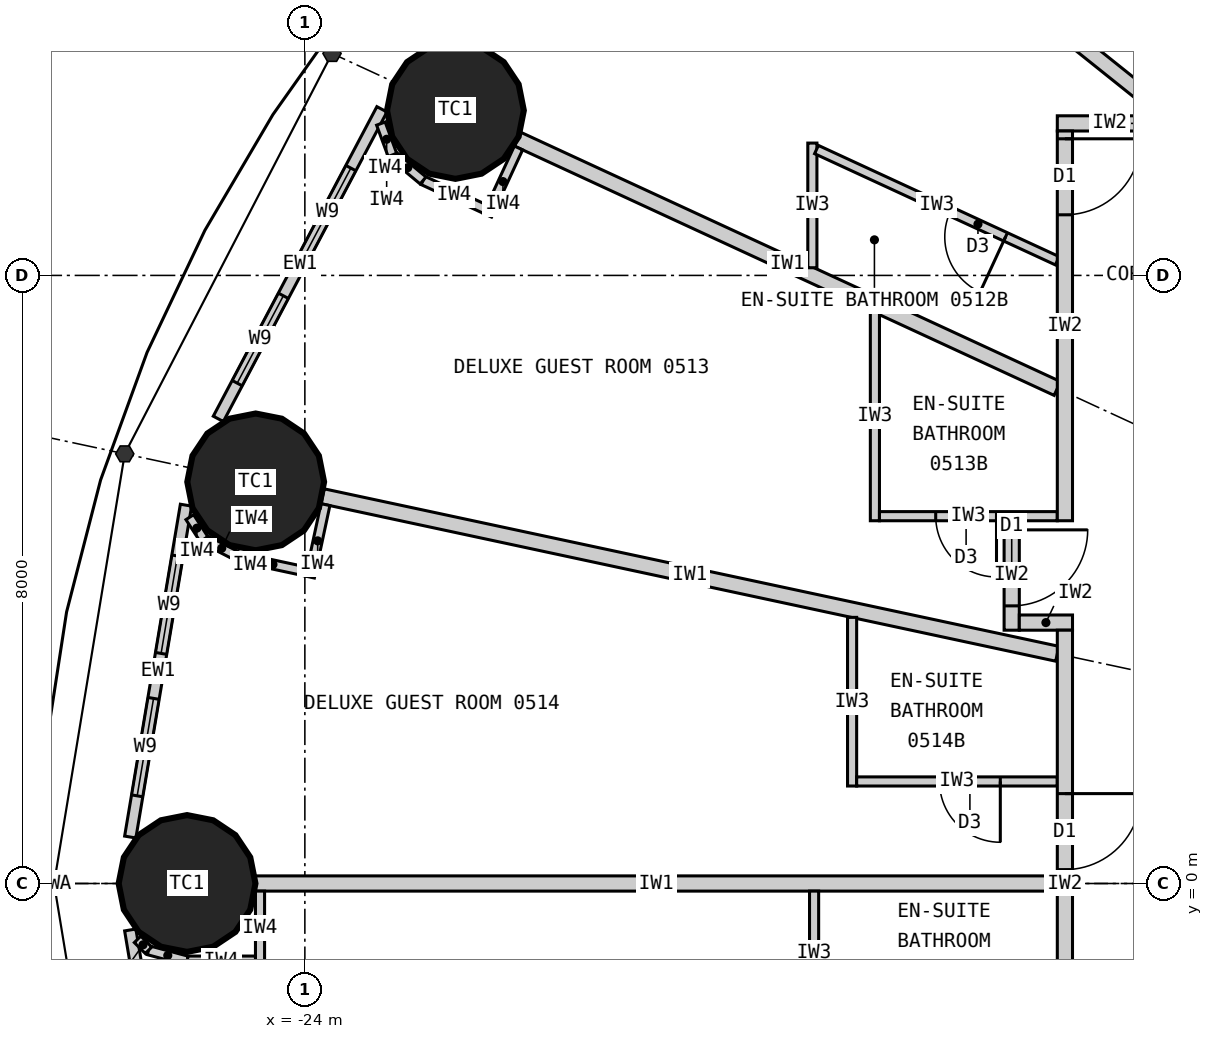
"""IFC4 building model, lengths in metres.
Left out: names, types, materials, properties, quantities, classifications, styles, units other than length and angle.
Written with IfcOpenShell. Run it as: python <this file> out.ifc"""

import sys

from ifc_helpers import new_model, si_unit, direction, frame, frame_2d, origin, origin_2d, place, context, subcontext, project, spatial, rectangle, circle, extrude, element, fill, save


model = new_model("IFC4")
c1 = context("Model", 3, precision=1e-05, world=origin(), true_north=direction((0.0, 1.0)))
c2 = subcontext(c1, "Body", "Model", "MODEL_VIEW")
j1 = project(units=[si_unit("LENGTHUNIT", "METRE"), si_unit("PLANEANGLEUNIT", "RADIAN")], contexts=[c1])
p1 = place(None, origin())
s1 = spatial("IfcSite", under=j1, at=p1, CompositionType="ELEMENT")
p2 = place(p1, origin())
s2 = spatial("IfcBuilding", under=s1, at=p2, CompositionType="ELEMENT")
p3 = place(p2, frame((0.0, 0.0, 29.4)))
s3 = spatial("IfcBuildingStorey", under=s2, at=p3, CompositionType="ELEMENT", Elevation=29.4)
for number, where, z_axis, x_axis in (
    (1, (-22.019, 10.17, 0.0), (0.0, 0.0, 1.0), (1.0, 0.0, 0.0)),
    (2, (-24.647, 5.283, 0.0), (0.0, 0.0, 1.0), (1.0, 0.0, 0.0)),
    (3, (-25.55, 0.0, 0.0), (0.0, 0.0, 1.0), (1.0, 0.0, 0.0)),
):
    element("IfcColumn", number, at=place(p3, frame(where, z_axis=z_axis, x_axis=x_axis)), inside=s3, PredefinedType="COLUMN", context=c2, shape_type="SweptSolid", body=[
        extrude(circle(Radius=0.9, at=origin_2d()), origin(), (0.0, 0.0, 1.0), 3.3),
    ])
p4 = place(p3, frame((-22.986, 10.185, 0.0), z_axis=(0.0, 0.0, 1.0), x_axis=(-0.467303182954, -0.884097129959, 0.0)))
e4 = element("IfcWall", 4, at=p4, inside=s3, PredefinedType="ELEMENTEDWALL", context=c2, shape_type="SweptSolid", body=[
    extrude(rectangle(XDim=4.606, YDim=0.15, at=frame_2d((2.303, 0.0))), origin(), (0.0, 0.0, 1.0), 3.12),
])
p5 = place(p4, frame((0.875, 0.0, 0.9)))
e5 = element("IfcOpeningElement", 5, at=p5, cuts=e4, PredefinedType="OPENING", context=c2, shape_type="SweptSolid", body=[
    extrude(rectangle(XDim=1.3, YDim=1.9, at=frame_2d((0.65, 0.95))), frame((0.0, 0.085, 0.0), z_axis=(0.0, -1.0, 0.0), x_axis=(1.0, 0.0, 0.0)), (0.0, 0.0, 1.0), 0.17),
])
p6 = place(p4, frame((2.775, 0.0, 0.9)))
e6 = element("IfcOpeningElement", 6, at=p6, cuts=e4, PredefinedType="OPENING", context=c2, shape_type="SweptSolid", body=[
    extrude(rectangle(XDim=1.3, YDim=1.9, at=frame_2d((0.65, 0.95))), frame((0.0, 0.085, 0.0), z_axis=(0.0, -1.0, 0.0), x_axis=(1.0, 0.0, 0.0)), (0.0, 0.0, 1.0), 0.17),
])
p7 = place(p3, frame((-25.564, 4.978, 0.0), z_axis=(0.0, 0.0, 1.0), x_axis=(-0.165641751141, -0.986185991727, 0.0)))
e7 = element("IfcWall", 7, at=p7, inside=s3, PredefinedType="ELEMENTEDWALL", context=c2, shape_type="SweptSolid", body=[
    extrude(rectangle(XDim=4.428, YDim=0.15, at=frame_2d((2.214, 0.0))), origin(), (0.0, 0.0, 1.0), 3.12),
])
p8 = place(p7, frame((0.678, 0.0, 0.9)))
e8 = element("IfcOpeningElement", 8, at=p8, cuts=e7, PredefinedType="OPENING", context=c2, shape_type="SweptSolid", body=[
    extrude(rectangle(XDim=1.3, YDim=1.9, at=frame_2d((0.65, 0.95))), frame((0.0, 0.085, 0.0), z_axis=(0.0, -1.0, 0.0), x_axis=(1.0, 0.0, 0.0)), (0.0, 0.0, 1.0), 0.17),
])
p9 = place(p7, frame((2.578, 0.0, 0.9)))
e9 = element("IfcOpeningElement", 9, at=p9, cuts=e7, PredefinedType="OPENING", context=c2, shape_type="SweptSolid", body=[
    extrude(rectangle(XDim=1.3, YDim=1.9, at=frame_2d((0.65, 0.95))), frame((0.0, 0.085, 0.0), z_axis=(0.0, -1.0, 0.0), x_axis=(1.0, 0.0, 0.0)), (0.0, 0.0, 1.0), 0.17),
])
p10 = place(p3, frame((-26.297, -0.611, 0.0), z_axis=(0.0, 0.0, 1.0), x_axis=(0.165641751141, -0.986185991727, 0.0)))
e10 = element("IfcWall", 10, at=p10, inside=s3, PredefinedType="ELEMENTEDWALL", context=c2, shape_type="SweptSolid", body=[
    extrude(rectangle(XDim=4.428, YDim=0.15, at=frame_2d((2.214, 0.0))), origin(), (0.0, 0.0, 1.0), 3.12),
])
p11 = place(p10, frame((0.55, 0.0, 0.9)))
e11 = element("IfcOpeningElement", 11, at=p11, cuts=e10, PredefinedType="OPENING", context=c2, shape_type="SweptSolid", body=[
    extrude(rectangle(XDim=1.3, YDim=1.9, at=frame_2d((0.65, 0.95))), frame((0.0, 0.085, 0.0), z_axis=(0.0, -1.0, 0.0), x_axis=(1.0, 0.0, 0.0)), (0.0, 0.0, 1.0), 0.17),
])
p12 = place(p10, frame((2.45, 0.0, 0.9)))
e12 = element("IfcOpeningElement", 12, at=p12, cuts=e10, PredefinedType="OPENING", context=c2, shape_type="SweptSolid", body=[
    extrude(rectangle(XDim=1.3, YDim=1.9, at=frame_2d((0.65, 0.95))), frame((0.0, 0.085, 0.0), z_axis=(0.0, -1.0, 0.0), x_axis=(1.0, 0.0, 0.0)), (0.0, 0.0, 1.0), 0.17),
])
p13 = place(p3, frame((-12.625, 10.1, 0.0), z_axis=(0.0, 0.0, 1.0), x_axis=(-0.780872884676, 0.624689953479, 0.0)))
e13 = element("IfcWall", 13, at=p13, inside=s3, PredefinedType="PARTITIONING", context=c2, shape_type="SweptSolid", body=[
    extrude(rectangle(XDim=5.845, YDim=0.2, at=frame_2d((2.922, 0.0))), origin(), (0.0, 0.0, 1.0), 2.32),
])
p14 = place(p3, frame((-14.1, 6.512, 0.0), z_axis=(0.0, 0.0, 1.0), x_axis=(-0.907842433118, 0.41931147925, 0.0)))
e14 = element("IfcWall", 14, at=p14, inside=s3, PredefinedType="PARTITIONING", context=c2, shape_type="SweptSolid", body=[
    extrude(rectangle(XDim=7.823, YDim=0.2, at=frame_2d((3.912, 0.0))), origin(), (0.0, 0.0, 1.0), 2.32),
])
p15 = place(p3, frame((-14.1, 3.022, 0.0), z_axis=(0.0, 0.0, 1.0), x_axis=(-0.977786510688, 0.209603290805, 0.0)))
e15 = element("IfcWall", 15, at=p15, inside=s3, PredefinedType="PARTITIONING", context=c2, shape_type="SweptSolid", body=[
    extrude(rectangle(XDim=9.887, YDim=0.2, at=frame_2d((4.943, 0.0))), origin(), (0.0, 0.0, 1.0), 2.32),
])
p16 = place(p3, frame((-14.1, 0.0, 0.0), z_axis=(0.0, 0.0, 1.0), x_axis=(-1.0, 0.0, 0.0)))
e16 = element("IfcWall", 16, at=p16, inside=s3, PredefinedType="PARTITIONING", context=c2, shape_type="SweptSolid", body=[
    extrude(rectangle(XDim=10.55, YDim=0.2, at=frame_2d((5.275, 0.0))), origin(), (0.0, 0.0, 1.0), 2.27),
])
p17 = place(p3, frame((-17.323, 8.101, 0.0), z_axis=(0.0, 0.0, 1.0), x_axis=(0.0, 1.0, 0.0)))
e17 = element("IfcWall", 17, at=p17, inside=s3, PredefinedType="PARTITIONING", context=c2, shape_type="SweptSolid", body=[
    extrude(rectangle(XDim=1.64, YDim=0.12, at=frame_2d((0.82, 0.0))), origin(), (0.0, 0.0, 1.0), 3.12),
])
p18 = place(p3, frame((-14.1, 8.193, 0.0), z_axis=(0.0, 0.0, 1.0), x_axis=(-0.907836493557, 0.419324338628, 0.0)))
e18 = element("IfcWall", 18, at=p18, inside=s3, PredefinedType="PARTITIONING", context=c2, shape_type="SweptSolid", body=[
    extrude(rectangle(XDim=3.49, YDim=0.12, at=frame_2d((1.745, 0.0))), origin(), (0.0, 0.0, 1.0), 3.12),
])
p19 = place(p18, frame((0.75, 0.0, 0.0)))
e19 = element("IfcOpeningElement", 19, at=p19, cuts=e18, PredefinedType="OPENING", context=c2, shape_type="SweptSolid", body=[
    extrude(rectangle(XDim=0.8, YDim=2.1, at=frame_2d((0.4, 1.05))), frame((0.0, 0.07, 0.0), z_axis=(0.0, -1.0, 0.0), x_axis=(1.0, 0.0, 0.0)), (0.0, 0.0, 1.0), 0.14),
])
p20 = place(p3, frame((-16.5, 7.521, 0.0), z_axis=(0.0, 0.0, 1.0), x_axis=(0.0, -1.0, 0.0)))
e20 = element("IfcWall", 20, at=p20, inside=s3, PredefinedType="PARTITIONING", context=c2, shape_type="SweptSolid", body=[
    extrude(rectangle(XDim=2.749, YDim=0.12, at=frame_2d((1.374, 0.0))), origin(), (0.0, 0.0, 1.0), 3.12),
])
p21 = place(p3, frame((-14.1, 4.833, 0.0), z_axis=(0.0, 0.0, 1.0), x_axis=(-1.0, 0.0, 0.0)))
e21 = element("IfcWall", 21, at=p21, inside=s3, PredefinedType="PARTITIONING", context=c2, shape_type="SweptSolid", body=[
    extrude(rectangle(XDim=2.34, YDim=0.12, at=frame_2d((1.17, 0.0))), origin(), (0.0, 0.0, 1.0), 3.12),
])
p22 = place(p21, frame((0.8, 0.0, 0.0)))
e22 = element("IfcOpeningElement", 22, at=p22, cuts=e21, PredefinedType="OPENING", context=c2, shape_type="SweptSolid", body=[
    extrude(rectangle(XDim=0.8, YDim=2.1, at=frame_2d((0.4, 1.05))), frame((0.0, 0.07, 0.0), z_axis=(0.0, -1.0, 0.0), x_axis=(1.0, 0.0, 0.0)), (0.0, 0.0, 1.0), 0.14),
])
p23 = place(p3, frame((-16.8, 3.501, 0.0), z_axis=(0.0, 0.0, 1.0), x_axis=(0.0, -1.0, 0.0)))
e23 = element("IfcWall", 23, at=p23, inside=s3, PredefinedType="PARTITIONING", context=c2, shape_type="SweptSolid", body=[
    extrude(rectangle(XDim=2.219, YDim=0.12, at=frame_2d((1.109, 0.0))), origin(), (0.0, 0.0, 1.0), 3.12),
])
p24 = place(p3, frame((-14.1, 1.343, 0.0), z_axis=(0.0, 0.0, 1.0), x_axis=(-1.0, 0.0, 0.0)))
e24 = element("IfcWall", 24, at=p24, inside=s3, PredefinedType="PARTITIONING", context=c2, shape_type="SweptSolid", body=[
    extrude(rectangle(XDim=2.64, YDim=0.12, at=frame_2d((1.32, 0.0))), origin(), (0.0, 0.0, 1.0), 3.12),
])
p25 = place(p24, frame((0.75, 0.0, 0.0)))
e25 = element("IfcOpeningElement", 25, at=p25, cuts=e24, PredefinedType="OPENING", context=c2, shape_type="SweptSolid", body=[
    extrude(rectangle(XDim=0.8, YDim=2.1, at=frame_2d((0.4, 1.05))), frame((0.0, 0.07, 0.0), z_axis=(0.0, -1.0, 0.0), x_axis=(1.0, 0.0, 0.0)), (0.0, 0.0, 1.0), 0.14),
])
p26 = place(p3, frame((-17.3, -0.1, 0.0), z_axis=(0.0, 0.0, 1.0), x_axis=(0.0, -1.0, 0.0)))
e26 = element("IfcWall", 26, at=p26, inside=s3, PredefinedType="PARTITIONING", context=c2, shape_type="SweptSolid", body=[
    extrude(rectangle(XDim=1.64, YDim=0.12, at=frame_2d((0.82, 0.0))), origin(), (0.0, 0.0, 1.0), 3.12),
])
p27 = place(p3, frame((-14.7, 4.772, 0.0), z_axis=(0.0, 0.0, 1.0), x_axis=(0.0, -1.0, 0.0)))
e27 = element("IfcWall", 27, at=p27, inside=s3, PredefinedType="PARTITIONING", context=c2, shape_type="SweptSolid", body=[
    extrude(rectangle(XDim=1.44, YDim=0.2, at=frame_2d((0.72, 0.0))), origin(), (0.0, 0.0, 1.0), 3.12),
])
p28 = place(p27, frame((0.12, 0.0, 0.0)))
e28 = element("IfcOpeningElement", 28, at=p28, cuts=e27, PredefinedType="OPENING", context=c2, shape_type="SweptSolid", body=[
    extrude(rectangle(XDim=1.0, YDim=2.2, at=frame_2d((0.5, 1.1))), frame((0.0, 0.11, 0.0), z_axis=(0.0, -1.0, 0.0), x_axis=(1.0, 0.0, 0.0)), (0.0, 0.0, 1.0), 0.22),
])
p29 = place(p3, frame((-13.9, 3.433, 0.0), z_axis=(0.0, 0.0, 1.0), x_axis=(-1.0, 0.0, 0.0)))
e29 = element("IfcWall", 29, at=p29, inside=s3, PredefinedType="PARTITIONING", context=c2, shape_type="SweptSolid", body=[
    extrude(rectangle(XDim=0.7, YDim=0.2, at=frame_2d((0.35, 0.0))), origin(), (0.0, 0.0, 1.0), 2.32),
])
p30 = place(p3, frame((-14.1, 10.0, 0.0), z_axis=(0.0, 0.0, 1.0), x_axis=(1.0, 0.0, 0.0)))
e30 = element("IfcWall", 30, at=p30, inside=s3, PredefinedType="PARTITIONING", context=c2, shape_type="SweptSolid", body=[
    extrude(rectangle(XDim=2.481, YDim=0.2, at=frame_2d((1.24, 0.0))), origin(), (0.0, 0.0, 1.0), 3.12),
])
p31 = place(p3, frame((-14.0, 9.9, 0.0), z_axis=(0.0, 0.0, 1.0), x_axis=(0.0, -1.0, 0.0)))
e31 = element("IfcWall", 31, at=p31, inside=s3, PredefinedType="PARTITIONING", context=c2, shape_type="SweptSolid", body=[
    extrude(rectangle(XDim=5.127, YDim=0.2, at=frame_2d((2.564, 0.0))), origin(), (0.0, 0.0, 1.0), 3.12),
])
p32 = place(p31, frame((0.103, 0.0, 0.0)))
e32 = element("IfcOpeningElement", 32, at=p32, cuts=e31, PredefinedType="OPENING", context=c2, shape_type="SweptSolid", body=[
    extrude(rectangle(XDim=1.0, YDim=2.2, at=frame_2d((0.5, 1.1))), frame((0.0, 0.11, 0.0), z_axis=(0.0, -1.0, 0.0), x_axis=(1.0, 0.0, 0.0)), (0.0, 0.0, 1.0), 0.22),
])
p33 = place(p3, frame((-14.0, 3.333, 0.0), z_axis=(0.0, 0.0, 1.0), x_axis=(0.0, -1.0, 0.0)))
e33 = element("IfcWall", 33, at=p33, inside=s3, PredefinedType="PARTITIONING", context=c2, shape_type="SweptSolid", body=[
    extrude(rectangle(XDim=6.665, YDim=0.2, at=frame_2d((3.333, 0.0))), origin(), (0.0, 0.0, 1.0), 3.12),
])
p34 = place(p33, frame((2.15, 0.0, 0.0)))
e34 = element("IfcOpeningElement", 34, at=p34, cuts=e33, PredefinedType="OPENING", context=c2, shape_type="SweptSolid", body=[
    extrude(rectangle(XDim=1.0, YDim=2.2, at=frame_2d((0.5, 1.1))), frame((0.0, 0.11, 0.0), z_axis=(0.0, -1.0, 0.0), x_axis=(1.0, 0.0, 0.0)), (0.0, 0.0, 1.0), 0.22),
])
p35 = place(p33, frame((5.173, 0.0, 0.0)))
e35 = element("IfcOpeningElement", 35, at=p35, cuts=e33, PredefinedType="OPENING", context=c2, shape_type="SweptSolid", body=[
    extrude(rectangle(XDim=1.0, YDim=2.2, at=frame_2d((0.5, 1.1))), frame((0.0, 0.11, 0.0), z_axis=(0.0, -1.0, 0.0), x_axis=(1.0, 0.0, 0.0)), (0.0, 0.0, 1.0), 0.22),
])
p36 = place(p3, frame((-21.189, 9.677, 0.0), z_axis=(0.0, 0.0, 1.0), x_axis=(-0.419344098106, -0.907827366509, 0.0)))
e36 = element("IfcWall", 36, at=p36, inside=s3, PredefinedType="PARTITIONING", context=c2, shape_type="SweptSolid", body=[
    extrude(rectangle(XDim=0.975, YDim=0.12, at=frame_2d((0.487, 0.0))), origin(), (0.0, 0.0, 1.0), 3.12),
])
p37 = place(p3, frame((-21.627, 8.872, 0.0), z_axis=(0.0, 0.0, 1.0), x_axis=(-0.907935564339, 0.419109783957, 0.0)))
e37 = element("IfcWall", 37, at=p37, inside=s3, PredefinedType="PARTITIONING", context=c2, shape_type="SweptSolid", body=[
    extrude(rectangle(XDim=0.9, YDim=0.12, at=frame_2d((0.45, 0.0))), origin(), (0.0, 0.0, 1.0), 3.12),
])
p38 = place(p3, frame((-22.445, 9.249, 0.0), z_axis=(0.0, 0.0, 1.0), x_axis=(-0.768335565584, 0.640047231584, 0.0)))
e38 = element("IfcWall", 38, at=p38, inside=s3, PredefinedType="PARTITIONING", context=c2, shape_type="SweptSolid", body=[
    extrude(rectangle(XDim=0.525, YDim=0.12, at=frame_2d((0.263, 0.0))), origin(), (0.0, 0.0, 1.0), 3.12),
])
p39 = place(p3, frame((-22.848, 9.585, 0.0), z_axis=(0.0, 0.0, 1.0), x_axis=(-0.345267312673, 0.938504386138, 0.0)))
e39 = element("IfcWall", 39, at=p39, inside=s3, PredefinedType="PARTITIONING", context=c2, shape_type="SweptSolid", body=[
    extrude(rectangle(XDim=0.439, YDim=0.12, at=frame_2d((0.22, 0.0))), origin(), (0.0, 0.0, 1.0), 3.12),
])
p40 = place(p3, frame((-23.729, 4.984, 0.0), z_axis=(0.0, 0.0, 1.0), x_axis=(-0.20968306268, -0.977769406979, 0.0)))
e40 = element("IfcWall", 40, at=p40, inside=s3, PredefinedType="PARTITIONING", context=c2, shape_type="SweptSolid", body=[
    extrude(rectangle(XDim=0.975, YDim=0.12, at=frame_2d((0.487, 0.0))), origin(), (0.0, 0.0, 1.0), 3.12),
])
p41 = place(p3, frame((-23.98, 4.103, 0.0), z_axis=(0.0, 0.0, 1.0), x_axis=(-0.977762694187, 0.209714362543, 0.0)))
e41 = element("IfcWall", 41, at=p41, inside=s3, PredefinedType="PARTITIONING", context=c2, shape_type="SweptSolid", body=[
    extrude(rectangle(XDim=0.9, YDim=0.12, at=frame_2d((0.45, 0.0))), origin(), (0.0, 0.0, 1.0), 3.12),
])
p42 = place(p3, frame((-24.86, 4.291, 0.0), z_axis=(0.0, 0.0, 1.0), x_axis=(-0.890204323062, 0.455561481254, 0.0)))
e42 = element("IfcWall", 42, at=p42, inside=s3, PredefinedType="PARTITIONING", context=c2, shape_type="SweptSolid", body=[
    extrude(rectangle(XDim=0.525, YDim=0.12, at=frame_2d((0.263, 0.0))), origin(), (0.0, 0.0, 1.0), 3.12),
])
p43 = place(p3, frame((-25.327, 4.531, 0.0), z_axis=(0.0, 0.0, 1.0), x_axis=(-0.543516034791, 0.839398784801, 0.0)))
e43 = element("IfcWall", 43, at=p43, inside=s3, PredefinedType="PARTITIONING", context=c2, shape_type="SweptSolid", body=[
    extrude(rectangle(XDim=0.344, YDim=0.12, at=frame_2d((0.172, 0.0))), origin(), (0.0, 0.0, 1.0), 3.12),
])
p44 = place(p3, frame((-24.59, -0.1, 0.0), z_axis=(0.0, 0.0, 1.0), x_axis=(0.0, -1.0, 0.0)))
e44 = element("IfcWall", 44, at=p44, inside=s3, PredefinedType="PARTITIONING", context=c2, shape_type="SweptSolid", body=[
    extrude(rectangle(XDim=0.974, YDim=0.12, at=frame_2d((0.487, 0.0))), origin(), (0.0, 0.0, 1.0), 3.12),
])
p45 = place(p3, frame((-24.65, -1.015, 0.0), z_axis=(0.0, 0.0, 1.0), x_axis=(-1.0, 0.0, 0.0)))
e45 = element("IfcWall", 45, at=p45, inside=s3, PredefinedType="PARTITIONING", context=c2, shape_type="SweptSolid", body=[
    extrude(rectangle(XDim=0.9, YDim=0.12, at=frame_2d((0.45, 0.0))), origin(), (0.0, 0.0, 1.0), 3.12),
])
p46 = place(p3, frame((-25.55, -1.015, 0.0), z_axis=(0.0, 0.0, 1.0), x_axis=(-0.96590239779, 0.258906465625, 0.0)))
e46 = element("IfcWall", 46, at=p46, inside=s3, PredefinedType="PARTITIONING", context=c2, shape_type="SweptSolid", body=[
    extrude(rectangle(XDim=0.525, YDim=0.12, at=frame_2d((0.263, 0.0))), origin(), (0.0, 0.0, 1.0), 3.12),
])
p47 = place(p3, frame((-26.057, -0.879, 0.0), z_axis=(0.0, 0.0, 1.0), x_axis=(-0.707106781187, 0.707106781187, 0.0)))
e47 = element("IfcWall", 47, at=p47, inside=s3, PredefinedType="PARTITIONING", context=c2, shape_type="SweptSolid", body=[
    extrude(rectangle(XDim=0.204, YDim=0.12, at=frame_2d((0.102, 0.0))), origin(), (0.0, 0.0, 1.0), 3.12),
])
p48 = place(p5, origin())
e48 = element("IfcWindow", 48, at=p48, inside=s3, PartitioningType="SINGLE_PANEL", PredefinedType="WINDOW", context=c2, shape_type="SweptSolid", body=[
    extrude(rectangle(XDim=1.3, YDim=1.9, at=frame_2d((0.65, 0.95))), frame((0.0, 0.03, 0.0), z_axis=(0.0, -1.0, 0.0), x_axis=(1.0, 0.0, 0.0)), (0.0, 0.0, 1.0), 0.06),
])
fill(e5, e48)
p49 = place(p6, origin())
e49 = element("IfcWindow", 49, at=p49, inside=s3, PartitioningType="SINGLE_PANEL", PredefinedType="WINDOW", context=c2, shape_type="SweptSolid", body=[
    extrude(rectangle(XDim=1.3, YDim=1.9, at=frame_2d((0.65, 0.95))), frame((0.0, 0.03, 0.0), z_axis=(0.0, -1.0, 0.0), x_axis=(1.0, 0.0, 0.0)), (0.0, 0.0, 1.0), 0.06),
])
fill(e6, e49)
p50 = place(p8, origin())
e50 = element("IfcWindow", 50, at=p50, inside=s3, PartitioningType="SINGLE_PANEL", PredefinedType="WINDOW", context=c2, shape_type="SweptSolid", body=[
    extrude(rectangle(XDim=1.3, YDim=1.9, at=frame_2d((0.65, 0.95))), frame((0.0, 0.03, 0.0), z_axis=(0.0, -1.0, 0.0), x_axis=(1.0, 0.0, 0.0)), (0.0, 0.0, 1.0), 0.06),
])
fill(e8, e50)
p51 = place(p9, origin())
e51 = element("IfcWindow", 51, at=p51, inside=s3, PartitioningType="SINGLE_PANEL", PredefinedType="WINDOW", context=c2, shape_type="SweptSolid", body=[
    extrude(rectangle(XDim=1.3, YDim=1.9, at=frame_2d((0.65, 0.95))), frame((0.0, 0.03, 0.0), z_axis=(0.0, -1.0, 0.0), x_axis=(1.0, 0.0, 0.0)), (0.0, 0.0, 1.0), 0.06),
])
fill(e9, e51)
p52 = place(p19, origin())
e52 = element("IfcDoor", 52, at=p52, inside=s3, OperationType="SINGLE_SWING_LEFT", PredefinedType="DOOR", context=c2, shape_type="SweptSolid", body=[
    extrude(rectangle(XDim=0.8, YDim=2.1, at=frame_2d((0.4, 1.05))), frame((0.0, 0.025, 0.0), z_axis=(0.0, -1.0, 0.0), x_axis=(1.0, 0.0, 0.0)), (0.0, 0.0, 1.0), 0.05),
])
fill(e19, e52)
p53 = place(p32, origin())
e53 = element("IfcDoor", 53, at=p53, inside=s3, OperationType="SINGLE_SWING_LEFT", PredefinedType="DOOR", context=c2, shape_type="SweptSolid", body=[
    extrude(rectangle(XDim=1.0, YDim=2.2, at=frame_2d((0.5, 1.1))), frame((0.0, 0.025, 0.0), z_axis=(0.0, -1.0, 0.0), x_axis=(1.0, 0.0, 0.0)), (0.0, 0.0, 1.0), 0.05),
])
fill(e32, e53)
p54 = place(p22, origin())
e54 = element("IfcDoor", 54, at=p54, inside=s3, OperationType="SINGLE_SWING_LEFT", PredefinedType="DOOR", context=c2, shape_type="SweptSolid", body=[
    extrude(rectangle(XDim=0.8, YDim=2.1, at=frame_2d((0.4, 1.05))), frame((0.0, 0.025, 0.0), z_axis=(0.0, -1.0, 0.0), x_axis=(1.0, 0.0, 0.0)), (0.0, 0.0, 1.0), 0.05),
])
fill(e22, e54)
p55 = place(p28, origin())
e55 = element("IfcDoor", 55, at=p55, inside=s3, OperationType="SINGLE_SWING_LEFT", PredefinedType="DOOR", context=c2, shape_type="SweptSolid", body=[
    extrude(rectangle(XDim=1.0, YDim=2.2, at=frame_2d((0.5, 1.1))), frame((0.0, 0.025, 0.0), z_axis=(0.0, -1.0, 0.0), x_axis=(1.0, 0.0, 0.0)), (0.0, 0.0, 1.0), 0.05),
])
fill(e28, e55)
p56 = place(p25, origin())
e56 = element("IfcDoor", 56, at=p56, inside=s3, OperationType="SINGLE_SWING_LEFT", PredefinedType="DOOR", context=c2, shape_type="SweptSolid", body=[
    extrude(rectangle(XDim=0.8, YDim=2.1, at=frame_2d((0.4, 1.05))), frame((0.0, 0.025, 0.0), z_axis=(0.0, -1.0, 0.0), x_axis=(1.0, 0.0, 0.0)), (0.0, 0.0, 1.0), 0.05),
])
fill(e25, e56)
p57 = place(p34, origin())
e57 = element("IfcDoor", 57, at=p57, inside=s3, OperationType="SINGLE_SWING_LEFT", PredefinedType="DOOR", context=c2, shape_type="SweptSolid", body=[
    extrude(rectangle(XDim=1.0, YDim=2.2, at=frame_2d((0.5, 1.1))), frame((0.0, 0.025, 0.0), z_axis=(0.0, -1.0, 0.0), x_axis=(1.0, 0.0, 0.0)), (0.0, 0.0, 1.0), 0.05),
])
fill(e34, e57)
save(model, sys.argv[1])
